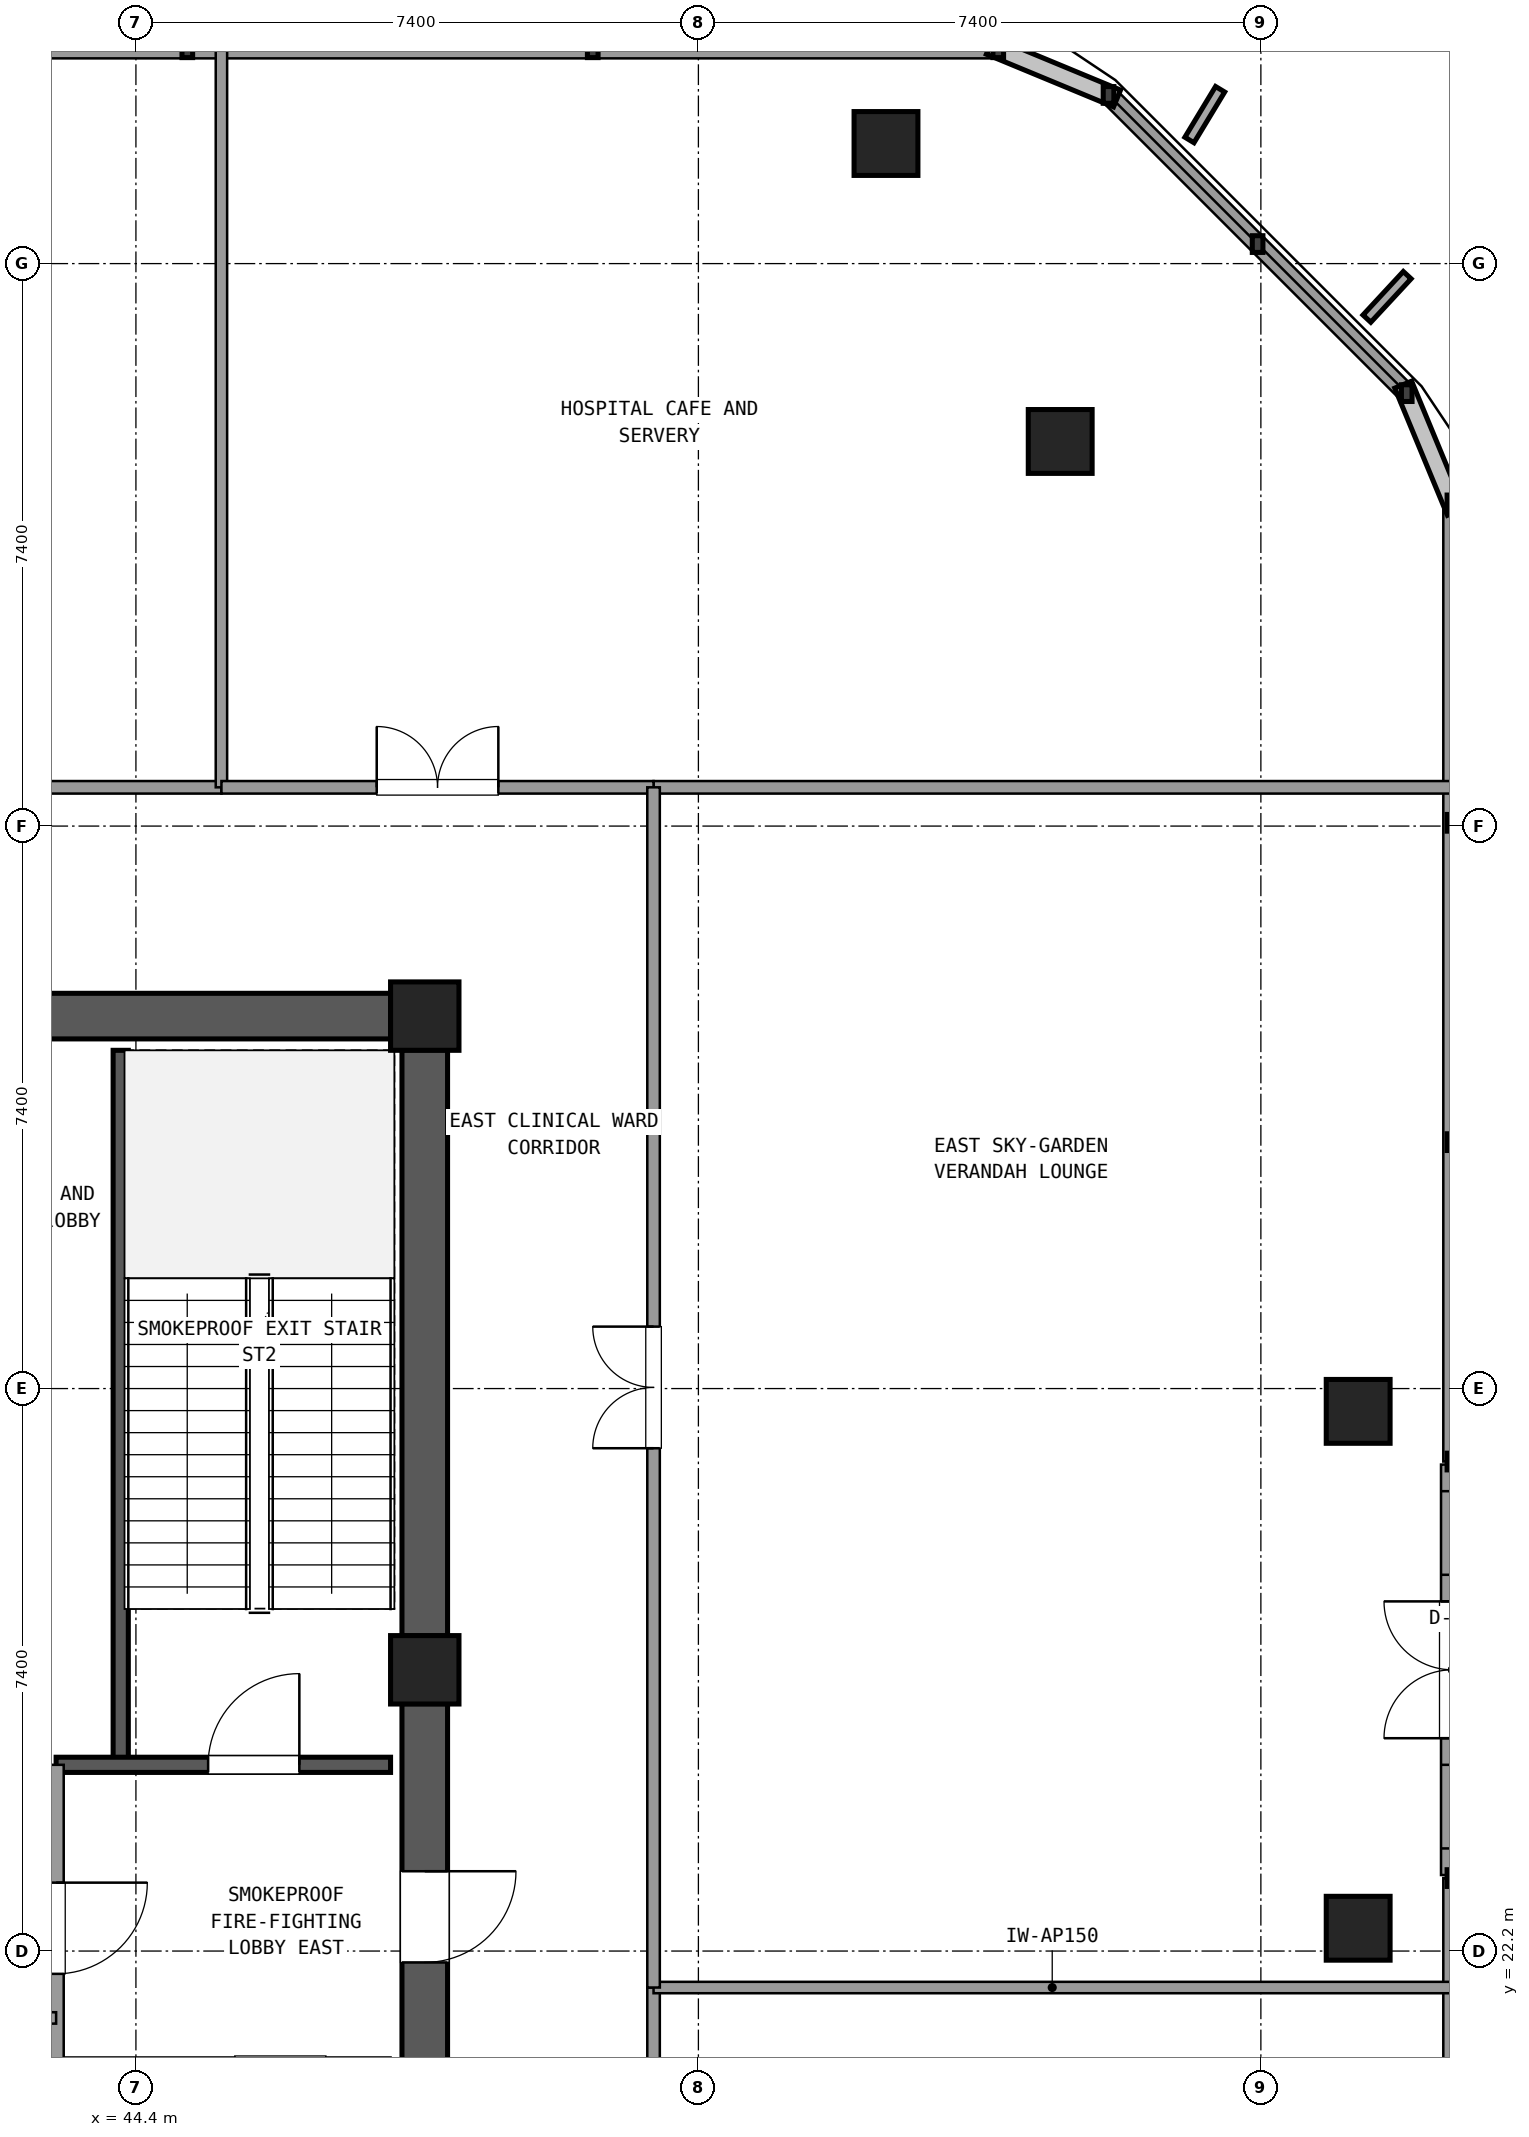
"""IFC4 building model, lengths in metres.
Left out: names, types, materials, properties, quantities, classifications, styles, units other than length and angle.
Written with IfcOpenShell. Run it as: python <this file> out.ifc"""

import sys

from ifc_helpers import new_model, si_unit, direction, frame, frame_2d, origin, origin_2d, place, context, subcontext, project, spatial, rectangle, extrude, element, fill, save


model = new_model("IFC4")
c1 = context("Model", 3, precision=1e-05, world=origin(), true_north=direction((0.0, 1.0)))
c2 = subcontext(c1, "Body", "Model", "MODEL_VIEW")
j1 = project(units=[si_unit("LENGTHUNIT", "METRE"), si_unit("PLANEANGLEUNIT", "RADIAN")], contexts=[c1])
p1 = place(None, origin())
s1 = spatial("IfcSite", under=j1, at=p1, CompositionType="ELEMENT")
p2 = place(p1, origin())
s2 = spatial("IfcBuilding", under=s1, at=p2, CompositionType="ELEMENT")
p3 = place(p2, frame((0.0, 0.0, 237.06)))
s3 = spatial("IfcBuildingStorey", under=s2, at=p3, CompositionType="ELEMENT", Elevation=237.06)
for number, where, z_axis, x_axis in (
    (1, (48.2, 25.9, 0.0), (0.0, 0.0, 1.0), (1.0, 0.0, 0.0)),
    (2, (48.2, 34.5, 0.0), (0.0, 0.0, 1.0), (1.0, 0.0, 0.0)),
):
    element("IfcColumn", number, at=place(p3, frame(where, z_axis=z_axis, x_axis=x_axis)), inside=s3, PredefinedType="COLUMN", context=c2, shape_type="SweptSolid", body=[
        extrude(rectangle(XDim=0.9, YDim=0.9, at=origin_2d()), origin(), (0.0, 0.0, 1.0), 5.76),
    ])
p4 = place(p3, frame((48.2, 17.745, 0.0), z_axis=(0.0, 0.0, 1.0), x_axis=(0.0, 1.0, 0.0)))
e3 = element("IfcWall", 3, at=p4, inside=s3, PredefinedType="SHEAR", context=c2, shape_type="SweptSolid", body=[
    extrude(rectangle(XDim=7.71, YDim=0.6, at=frame_2d((3.855, 0.0))), origin(), (0.0, 0.0, 1.0), 5.48),
])
p5 = place(p4, frame((4.305, 0.0, 0.0)))
e4 = element("IfcOpeningElement", 4, at=p5, cuts=e3, PredefinedType="OPENING", context=c2, shape_type="SweptSolid", body=[
    extrude(rectangle(XDim=1.2, YDim=2.15, at=frame_2d((0.6, 1.075))), frame((0.0, 0.31, 0.0), z_axis=(0.0, -1.0, 0.0), x_axis=(1.0, 0.0, 0.0)), (0.0, 0.0, 1.0), 0.62),
])
p6 = place(p3, frame((48.2, 26.345, 0.0), z_axis=(0.0, 0.0, 1.0), x_axis=(0.0, 1.0, 0.0)))
e5 = element("IfcWall", 5, at=p6, inside=s3, PredefinedType="SHEAR", context=c2, shape_type="SweptSolid", body=[
    extrude(rectangle(XDim=7.71, YDim=0.6, at=frame_2d((3.855, 0.0))), origin(), (0.0, 0.0, 1.0), 5.48),
])
p7 = place(p3, frame((47.755, 34.5, 0.0), z_axis=(0.0, 0.0, 1.0), x_axis=(-1.0, 0.0, 0.0)))
e6 = element("IfcWall", 6, at=p7, inside=s3, PredefinedType="SHEAR", context=c2, shape_type="SweptSolid", body=[
    extrude(rectangle(XDim=10.31, YDim=0.6, at=frame_2d((5.155, 0.0))), origin(), (0.0, 0.0, 1.0), 5.48),
])
p8 = place(p7, frame((4.655, 0.0, 0.0)))
e7 = element("IfcOpeningElement", 7, at=p8, cuts=e6, PredefinedType="OPENING", context=c2, shape_type="SweptSolid", body=[
    extrude(rectangle(XDim=1.6, YDim=2.2, at=frame_2d((0.8, 1.1))), frame((0.0, 0.31, 0.0), z_axis=(0.0, -1.0, 0.0), x_axis=(1.0, 0.0, 0.0)), (0.0, 0.0, 1.0), 0.62),
])
for number, where, z_axis, x_axis in (
    (8, (60.48, 22.5, 0.0), (0.0, 0.0, 1.0), (1.0, 0.0, 0.0)),
    (9, (60.48, 29.3, 0.0), (0.0, 0.0, 1.0), (1.0, 0.0, 0.0)),
    (10, (56.56, 42.06, 0.0), (0.0, 0.0, 1.0), (1.0, 0.0, 0.0)),
    (11, (54.268, 45.98, 0.0), (0.0, 0.0, 1.0), (1.0, 0.0, 0.0)),
):
    element("IfcColumn", number, at=place(p3, frame(where, z_axis=z_axis, x_axis=x_axis)), inside=s3, PredefinedType="COLUMN", context=c2, shape_type="SweptSolid", body=[
        extrude(rectangle(XDim=0.84, YDim=0.84, at=origin_2d()), origin(), (0.0, 0.0, 1.0), 5.76),
    ])
p9 = place(p3, frame((61.72, 23.2, 0.0), z_axis=(0.0, 0.0, 1.0), x_axis=(0.0, 1.0, 0.0)))
e12 = element("IfcWall", 12, at=p9, inside=s3, PredefinedType="SOLIDWALL", context=c2, shape_type="SweptSolid", body=[
    extrude(rectangle(XDim=5.4, YDim=0.3, at=frame_2d((2.7, 0.0))), origin(), (0.0, 0.0, 1.0), 4.85),
])
p10 = place(p9, frame((1.8, 0.0, 0.0)))
e13 = element("IfcOpeningElement", 13, at=p10, cuts=e12, PredefinedType="OPENING", context=c2, shape_type="SweptSolid", body=[
    extrude(rectangle(XDim=1.8, YDim=2.25, at=frame_2d((0.9, 1.125))), frame((0.0, 0.16, 0.0), z_axis=(0.0, -1.0, 0.0), x_axis=(1.0, 0.0, 0.0)), (0.0, 0.0, 1.0), 0.32),
])
p11 = place(p9, frame((0.35, 0.0, 0.4)))
e14 = element("IfcOpeningElement", 14, at=p11, cuts=e12, PredefinedType="OPENING", context=c2, shape_type="SweptSolid", body=[
    extrude(rectangle(XDim=1.1, YDim=1.8, at=frame_2d((0.55, 0.9))), frame((0.0, 0.16, 0.0), z_axis=(0.0, -1.0, 0.0), x_axis=(1.0, 0.0, 0.0)), (0.0, 0.0, 1.0), 0.32),
])
p12 = place(p9, frame((3.95, 0.0, 0.4)))
e15 = element("IfcOpeningElement", 15, at=p12, cuts=e12, PredefinedType="OPENING", context=c2, shape_type="SweptSolid", body=[
    extrude(rectangle(XDim=1.1, YDim=1.8, at=frame_2d((0.55, 0.9))), frame((0.0, 0.16, 0.0), z_axis=(0.0, -1.0, 0.0), x_axis=(1.0, 0.0, 0.0)), (0.0, 0.0, 1.0), 0.32),
])
p13 = place(p3, frame((61.72, 10.555, 0.0), z_axis=(0.0, 0.0, 1.0), x_axis=(0.0, 1.0, 0.0)))
e16 = element("IfcWall", 16, at=p13, inside=s3, PredefinedType="SOLIDWALL", context=c2, shape_type="SweptSolid", body=[
    extrude(rectangle(XDim=12.605, YDim=0.24, at=frame_2d((6.302, 0.0))), origin(), (0.0, 0.0, 1.0), 0.85),
])
p14 = place(p3, frame((61.72, 28.64, 0.0), z_axis=(0.0, 0.0, 1.0), x_axis=(0.0, 1.0, 0.0)))
e17 = element("IfcWall", 17, at=p14, inside=s3, PredefinedType="SOLIDWALL", context=c2, shape_type="SweptSolid", body=[
    extrude(rectangle(XDim=12.605, YDim=0.24, at=frame_2d((6.303, 0.0))), origin(), (0.0, 0.0, 1.0), 0.85),
])
p15 = place(p3, frame((61.119, 42.696, 0.0), z_axis=(0.0, 0.0, 1.0), x_axis=(-0.707106781187, 0.707106781187, 0.0)))
e18 = element("IfcWall", 18, at=p15, inside=s3, PredefinedType="SOLIDWALL", context=c2, shape_type="SweptSolid", body=[
    extrude(rectangle(XDim=5.548, YDim=0.24, at=frame_2d((2.774, 0.0))), origin(), (0.0, 0.0, 1.0), 0.85),
])
p16 = place(p3, frame((55.745, 47.22, 0.0), z_axis=(0.0, 0.0, 1.0), x_axis=(-1.0, 0.0, 0.0)))
e19 = element("IfcWall", 19, at=p16, inside=s3, PredefinedType="SOLIDWALL", context=c2, shape_type="SweptSolid", body=[
    extrude(rectangle(XDim=16.004, YDim=0.24, at=frame_2d((8.002, 0.0))), origin(), (0.0, 0.0, 1.0), 0.85),
])
p17 = place(p3, frame((44.2, 24.65, 0.0), z_axis=(0.0, 0.0, 1.0), x_axis=(0.0, 1.0, 0.0)))
e20 = element("IfcWall", 20, at=p17, inside=s3, PredefinedType="SHEAR", context=c2, shape_type="SweptSolid", body=[
    extrude(rectangle(XDim=9.4, YDim=0.2, at=frame_2d((4.7, 0.0))), origin(), (0.0, 0.0, 1.0), 5.48),
])
p18 = place(p3, frame((43.35, 24.65, 0.0), z_axis=(0.0, 0.0, 1.0), x_axis=(1.0, 0.0, 0.0)))
e21 = element("IfcWall", 21, at=p18, inside=s3, PredefinedType="SHEAR", context=c2, shape_type="SweptSolid", body=[
    extrude(rectangle(XDim=4.4, YDim=0.2, at=frame_2d((2.2, 0.0))), origin(), (0.0, 0.0, 1.0), 5.48),
])
p19 = place(p18, frame((2.0, 0.0, 0.0)))
e22 = element("IfcOpeningElement", 22, at=p19, cuts=e21, PredefinedType="OPENING", context=c2, shape_type="SweptSolid", body=[
    extrude(rectangle(XDim=1.2, YDim=2.15, at=frame_2d((0.6, 1.075))), frame((0.0, 0.11, 0.0), z_axis=(0.0, -1.0, 0.0), x_axis=(1.0, 0.0, 0.0)), (0.0, 0.0, 1.0), 0.22),
])
p20 = place(p3, frame((43.35, 17.75, 0.0), z_axis=(0.0, 0.0, 1.0), x_axis=(0.0, 1.0, 0.0)))
e23 = element("IfcWall", 23, at=p20, inside=s3, PredefinedType="SOLIDWALL", context=c2, shape_type="SweptSolid", body=[
    extrude(rectangle(XDim=6.9, YDim=0.2, at=frame_2d((3.45, 0.0))), origin(), (0.0, 0.0, 1.0), 4.77),
])
p21 = place(p20, frame((4.15, 0.0, 0.0)))
e24 = element("IfcOpeningElement", 24, at=p21, cuts=e23, PredefinedType="OPENING", context=c2, shape_type="SweptSolid", body=[
    extrude(rectangle(XDim=1.2, YDim=2.15, at=frame_2d((0.6, 1.075))), frame((0.0, 0.11, 0.0), z_axis=(0.0, -1.0, 0.0), x_axis=(1.0, 0.0, 0.0)), (0.0, 0.0, 1.0), 0.22),
])
p22 = place(p3, frame((37.25, 21.32, 0.0), z_axis=(0.0, 0.0, 1.0), x_axis=(1.0, 0.0, 0.0)))
e25 = element("IfcWall", 25, at=p22, inside=s3, PredefinedType="PARTITIONING", context=c2, shape_type="SweptSolid", body=[
    extrude(rectangle(XDim=6.1, YDim=0.15, at=frame_2d((3.05, 0.0))), origin(), (0.0, 0.0, 1.0), 4.77),
])
p23 = place(p22, frame((0.55, 0.0, 0.0)))
e26 = element("IfcOpeningElement", 26, at=p23, cuts=e25, PredefinedType="OPENING", context=c2, shape_type="SweptSolid", body=[
    extrude(rectangle(XDim=1.0, YDim=2.15, at=frame_2d((0.5, 1.075))), frame((0.0, 0.085, 0.0), z_axis=(0.0, -1.0, 0.0), x_axis=(1.0, 0.0, 0.0)), (0.0, 0.0, 1.0), 0.17),
])
p24 = place(p22, frame((3.5, 0.0, 0.0)))
e27 = element("IfcOpeningElement", 27, at=p24, cuts=e25, PredefinedType="OPENING", context=c2, shape_type="SweptSolid", body=[
    extrude(rectangle(XDim=1.0, YDim=2.15, at=frame_2d((0.5, 1.075))), frame((0.0, 0.085, 0.0), z_axis=(0.0, -1.0, 0.0), x_axis=(1.0, 0.0, 0.0)), (0.0, 0.0, 1.0), 0.17),
])
p25 = place(p3, frame((51.21, 37.51, 0.0), z_axis=(0.0, 0.0, 1.0), x_axis=(1.0, 0.0, 0.0)))
e28 = element("IfcWall", 28, at=p25, inside=s3, PredefinedType="PARTITIONING", context=c2, shape_type="SweptSolid", body=[
    extrude(rectangle(XDim=10.49, YDim=0.165, at=frame_2d((5.245, 0.0))), origin(), (0.0, 0.0, 1.0), 4.77),
])
p26 = place(p3, frame((27.528, 37.51, 0.0), z_axis=(0.0, 0.0, 1.0), x_axis=(1.0, 0.0, 0.0)))
e29 = element("IfcWall", 29, at=p26, inside=s3, PredefinedType="PARTITIONING", context=c2, shape_type="SweptSolid", body=[
    extrude(rectangle(XDim=17.997, YDim=0.165, at=frame_2d((8.999, 0.0))), origin(), (0.0, 0.0, 1.0), 4.77),
])
p27 = place(p26, frame((7.438, 0.0, 0.0)))
e30 = element("IfcOpeningElement", 30, at=p27, cuts=e29, PredefinedType="OPENING", context=c2, shape_type="SweptSolid", body=[
    extrude(rectangle(XDim=1.6, YDim=2.2, at=frame_2d((0.8, 1.1))), frame((0.0, 0.093, 0.0), z_axis=(0.0, -1.0, 0.0), x_axis=(1.0, 0.0, 0.0)), (0.0, 0.0, 1.0), 0.185),
])
p28 = place(p3, frame((45.525, 37.51, 0.0), z_axis=(0.0, 0.0, 1.0), x_axis=(0.0, 1.0, 0.0)))
e31 = element("IfcWall", 31, at=p28, inside=s3, PredefinedType="PARTITIONING", context=c2, shape_type="SweptSolid", body=[
    extrude(rectangle(XDim=9.69, YDim=0.15, at=frame_2d((4.845, 0.0))), origin(), (0.0, 0.0, 1.0), 4.77),
])
p29 = place(p3, frame((45.525, 37.51, 0.0), z_axis=(0.0, 0.0, 1.0), x_axis=(1.0, 0.0, 0.0)))
e32 = element("IfcWall", 32, at=p29, inside=s3, PredefinedType="PARTITIONING", context=c2, shape_type="SweptSolid", body=[
    extrude(rectangle(XDim=5.685, YDim=0.165, at=frame_2d((2.843, 0.0))), origin(), (0.0, 0.0, 1.0), 4.77),
])
p30 = place(p29, frame((2.043, 0.0, 0.0)))
e33 = element("IfcOpeningElement", 33, at=p30, cuts=e32, PredefinedType="OPENING", context=c2, shape_type="SweptSolid", body=[
    extrude(rectangle(XDim=1.6, YDim=2.2, at=frame_2d((0.8, 1.1))), frame((0.0, 0.093, 0.0), z_axis=(0.0, -1.0, 0.0), x_axis=(1.0, 0.0, 0.0)), (0.0, 0.0, 1.0), 0.185),
])
p31 = place(p3, frame((51.21, 14.29, 0.0), z_axis=(0.0, 0.0, 1.0), x_axis=(0.0, 1.0, 0.0)))
e34 = element("IfcWall", 34, at=p31, inside=s3, PredefinedType="PARTITIONING", context=c2, shape_type="SweptSolid", body=[
    extrude(rectangle(XDim=7.43, YDim=0.165, at=frame_2d((3.715, 0.0))), origin(), (0.0, 0.0, 1.0), 4.77),
])
p32 = place(p31, frame((2.915, 0.0, 0.0)))
e35 = element("IfcOpeningElement", 35, at=p32, cuts=e34, PredefinedType="OPENING", context=c2, shape_type="SweptSolid", body=[
    extrude(rectangle(XDim=1.6, YDim=2.2, at=frame_2d((0.8, 1.1))), frame((0.0, 0.093, 0.0), z_axis=(0.0, -1.0, 0.0), x_axis=(1.0, 0.0, 0.0)), (0.0, 0.0, 1.0), 0.185),
])
p33 = place(p3, frame((51.21, 21.72, 0.0), z_axis=(0.0, 0.0, 1.0), x_axis=(1.0, 0.0, 0.0)))
e36 = element("IfcWall", 36, at=p33, inside=s3, PredefinedType="PARTITIONING", context=c2, shape_type="SweptSolid", body=[
    extrude(rectangle(XDim=10.49, YDim=0.15, at=frame_2d((5.245, 0.0))), origin(), (0.0, 0.0, 1.0), 4.77),
])
p34 = place(p3, frame((51.21, 21.72, 0.0), z_axis=(0.0, 0.0, 1.0), x_axis=(0.0, 1.0, 0.0)))
e37 = element("IfcWall", 37, at=p34, inside=s3, PredefinedType="PARTITIONING", context=c2, shape_type="SweptSolid", body=[
    extrude(rectangle(XDim=15.79, YDim=0.165, at=frame_2d((7.895, 0.0))), origin(), (0.0, 0.0, 1.0), 4.77),
])
p35 = place(p34, frame((7.095, 0.0, 0.0)))
e38 = element("IfcOpeningElement", 38, at=p35, cuts=e37, PredefinedType="OPENING", context=c2, shape_type="SweptSolid", body=[
    extrude(rectangle(XDim=1.6, YDim=2.2, at=frame_2d((0.8, 1.1))), frame((0.0, 0.093, 0.0), z_axis=(0.0, -1.0, 0.0), x_axis=(1.0, 0.0, 0.0)), (0.0, 0.0, 1.0), 0.185),
])
p36 = place(p19, origin())
e39 = element("IfcDoor", 39, at=p36, inside=s3, OperationType="SINGLE_SWING_RIGHT", PredefinedType="DOOR", context=c2, shape_type="SweptSolid", body=[
    extrude(rectangle(XDim=1.2, YDim=2.15, at=frame_2d((0.6, 1.075))), frame((0.0, 0.025, 0.0), z_axis=(0.0, -1.0, 0.0), x_axis=(1.0, 0.0, 0.0)), (0.0, 0.0, 1.0), 0.05),
])
fill(e22, e39)
p37 = place(p21, frame((1.2, 0.0, 0.0), z_axis=(0.0, 0.0, 1.0), x_axis=(-1.0, 0.0, 0.0)))
e40 = element("IfcDoor", 40, at=p37, inside=s3, OperationType="SINGLE_SWING_RIGHT", PredefinedType="DOOR", context=c2, shape_type="SweptSolid", body=[
    extrude(rectangle(XDim=1.2, YDim=2.15, at=frame_2d((0.6, 1.075))), frame((0.0, 0.025, 0.0), z_axis=(0.0, -1.0, 0.0), x_axis=(1.0, 0.0, 0.0)), (0.0, 0.0, 1.0), 0.05),
])
fill(e24, e40)
p38 = place(p5, frame((1.2, 0.0, 0.0), z_axis=(0.0, 0.0, 1.0), x_axis=(-1.0, 0.0, 0.0)))
e41 = element("IfcDoor", 41, at=p38, inside=s3, OperationType="SINGLE_SWING_RIGHT", PredefinedType="DOOR", context=c2, shape_type="SweptSolid", body=[
    extrude(rectangle(XDim=1.2, YDim=2.15, at=frame_2d((0.6, 1.075))), frame((0.0, 0.025, 0.0), z_axis=(0.0, -1.0, 0.0), x_axis=(1.0, 0.0, 0.0)), (0.0, 0.0, 1.0), 0.05),
])
fill(e4, e41)
p39 = place(p30, origin())
e42 = element("IfcDoor", 42, at=p39, inside=s3, OperationType="DOUBLE_DOOR_SINGLE_SWING", PredefinedType="DOOR", context=c2, shape_type="SweptSolid", body=[
    extrude(rectangle(XDim=1.6, YDim=2.2, at=frame_2d((0.8, 1.1))), frame((0.0, 0.025, 0.0), z_axis=(0.0, -1.0, 0.0), x_axis=(1.0, 0.0, 0.0)), (0.0, 0.0, 1.0), 0.05),
])
fill(e33, e42)
p40 = place(p35, origin())
e43 = element("IfcDoor", 43, at=p40, inside=s3, OperationType="DOUBLE_DOOR_SINGLE_SWING", PredefinedType="DOOR", context=c2, shape_type="SweptSolid", body=[
    extrude(rectangle(XDim=1.6, YDim=2.2, at=frame_2d((0.8, 1.1))), frame((0.0, 0.025, 0.0), z_axis=(0.0, -1.0, 0.0), x_axis=(1.0, 0.0, 0.0)), (0.0, 0.0, 1.0), 0.05),
])
fill(e38, e43)
save(model, sys.argv[1])
